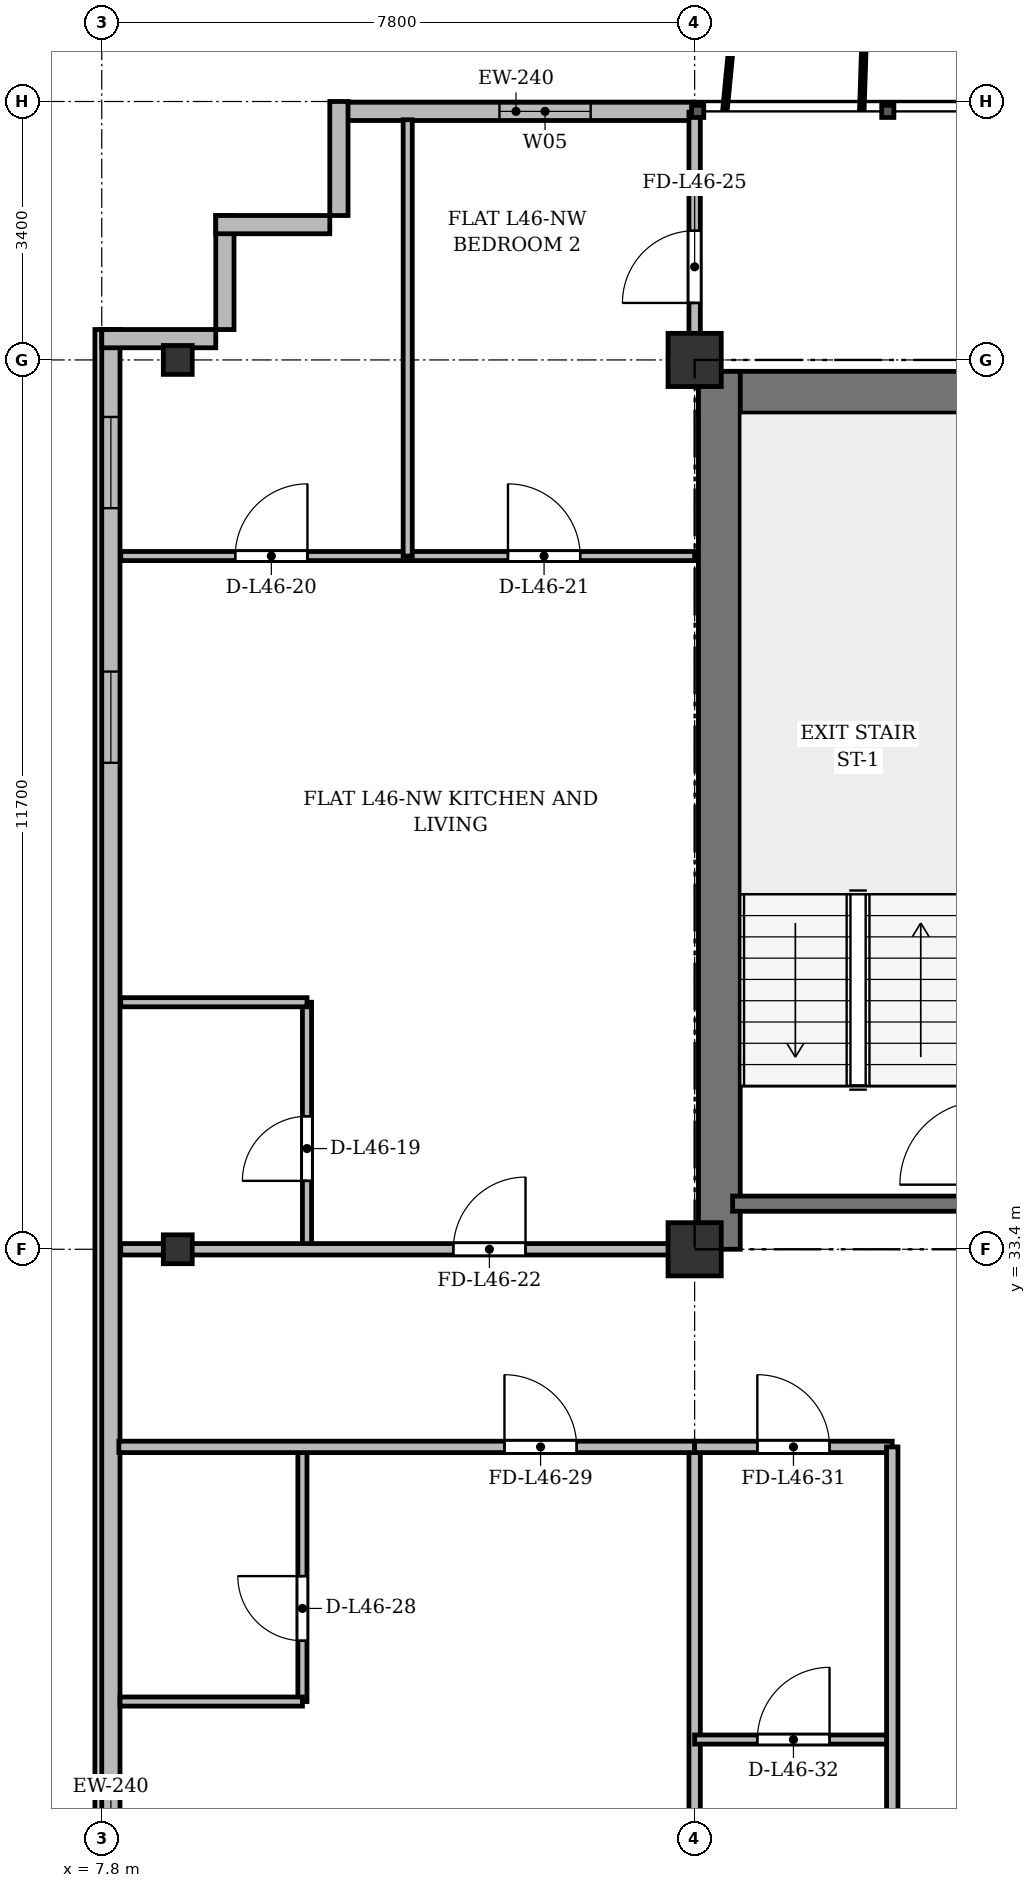
"""IFC4 building model, lengths in metres.
Left out: names, types, materials, properties, quantities, classifications, styles, units other than length and angle.
Written with IfcOpenShell. Run it as: python <this file> out.ifc"""

import sys

from ifc_helpers import new_model, si_unit, direction, frame, frame_2d, origin, origin_2d, place, context, subcontext, project, spatial, rectangle, i_section, extrude, source, transform, mapped, element, fill, save


model = new_model("IFC4")
c1 = context("Model", 3, precision=1e-05, world=origin(), true_north=direction((0.0, 1.0)))
c2 = subcontext(c1, "Body", "Model", "MODEL_VIEW")
j1 = project(units=[si_unit("LENGTHUNIT", "METRE"), si_unit("PLANEANGLEUNIT", "RADIAN")], contexts=[c1])
p1 = place(None, origin())
s1 = spatial("IfcSite", under=j1, at=p1, CompositionType="ELEMENT")
p2 = place(p1, origin())
s2 = spatial("IfcBuilding", under=s1, at=p2, CompositionType="ELEMENT")
p3 = place(p2, frame((0.0, 0.0, 175.3)))
s3 = spatial("IfcBuildingStorey", under=s2, at=p3, CompositionType="ELEMENT", Elevation=175.3)
m1 = source(origin(), c2, "Body", "SweptSolid", [
    extrude(i_section(OverallWidth=0.38, OverallDepth=0.38, WebThickness=0.02, FlangeThickness=0.03, at=origin_2d()), origin(), (0.0, 0.0, 1.0), 3.6),
])
for number, where, z_axis, x_axis in (
    (1, (8.8, 33.4, 0.0), (0.0, 0.0, 1.0), (1.0, 0.0, 0.0)),
    (2, (8.8, 45.1, 0.0), (0.0, 0.0, 1.0), (1.0, 0.0, 0.0)),
):
    element("IfcColumn", number, at=place(p3, frame(where, z_axis=z_axis, x_axis=x_axis)), inside=s3, PredefinedType="COLUMN", context=c2, shape_type="MappedRepresentation", body=[
        mapped(m1, transform((0.0, 0.0, 0.0), x_axis=(1.0, 0.0, 0.0), y_axis=(0.0, 1.0, 0.0), z_axis=(0.0, 0.0, 1.0), scale=1.0)),
    ])
m2 = source(origin(), c2, "Body", "SweptSolid", [
    extrude(rectangle(XDim=0.7, YDim=0.7, at=origin_2d()), origin(), (0.0, 0.0, 1.0), 3.6),
])
for number, where, z_axis, x_axis in (
    (3, (15.6, 33.4, 0.0), (0.0, 0.0, 1.0), (1.0, 0.0, 0.0)),
    (4, (15.6, 45.1, 0.0), (0.0, 0.0, 1.0), (1.0, 0.0, 0.0)),
):
    element("IfcColumn", number, at=place(p3, frame(where, z_axis=z_axis, x_axis=x_axis)), inside=s3, PredefinedType="COLUMN", context=c2, shape_type="MappedRepresentation", body=[
        mapped(m2, transform((0.0, 0.0, 0.0), x_axis=(1.0, 0.0, 0.0), y_axis=(0.0, 1.0, 0.0), z_axis=(0.0, 0.0, 1.0), scale=1.0)),
    ])
p4 = place(p3, frame((10.9, 48.37, 0.0), z_axis=(0.0, 0.0, 1.0), x_axis=(1.0, 0.0, 0.0)))
e5 = element("IfcWall", 5, at=p4, inside=s3, PredefinedType="SOLIDWALL", context=c2, shape_type="SweptSolid", body=[
    extrude(rectangle(XDim=4.7, YDim=0.24, at=frame_2d((2.35, 0.0))), origin(), (0.0, 0.0, 1.0), 3.35),
])
p5 = place(p4, frame((2.132, 0.0, 0.9)))
e6 = element("IfcOpeningElement", 6, at=p5, cuts=e5, PredefinedType="OPENING", context=c2, shape_type="SweptSolid", body=[
    extrude(rectangle(XDim=1.2, YDim=1.65, at=frame_2d((0.6, 0.825))), frame((0.0, 0.13, 0.0), z_axis=(0.0, -1.0, 0.0), x_axis=(1.0, 0.0, 0.0)), (0.0, 0.0, 1.0), 0.26),
])
p6 = place(p3, frame((7.92, 6.3, 0.0), z_axis=(0.0, 0.0, 1.0), x_axis=(0.0, 1.0, 0.0)))
e7 = element("IfcWall", 7, at=p6, inside=s3, PredefinedType="SOLIDWALL", context=c2, shape_type="SweptSolid", body=[
    extrude(rectangle(XDim=39.2, YDim=0.24, at=frame_2d((19.6, 0.0))), origin(), (0.0, 0.0, 1.0), 3.35),
])
p7 = place(p6, frame((1.45, 0.0, 0.92)))
e8 = element("IfcOpeningElement", 8, at=p7, cuts=e7, PredefinedType="OPENING", context=c2, shape_type="SweptSolid", body=[
    extrude(rectangle(XDim=1.2, YDim=1.65, at=frame_2d((0.6, 0.825))), frame((0.0, 0.13, 0.0), z_axis=(0.0, -1.0, 0.0), x_axis=(1.0, 0.0, 0.0)), (0.0, 0.0, 1.0), 0.26),
])
p8 = place(p6, frame((3.8, 0.0, 0.92)))
e9 = element("IfcOpeningElement", 9, at=p8, cuts=e7, PredefinedType="OPENING", context=c2, shape_type="SweptSolid", body=[
    extrude(rectangle(XDim=2.6, YDim=1.9, at=frame_2d((1.3, 0.95))), frame((0.0, 0.13, 0.0), z_axis=(0.0, -1.0, 0.0), x_axis=(1.0, 0.0, 0.0)), (0.0, 0.0, 1.0), 0.26),
])
p9 = place(p6, frame((8.0, 0.0, 0.92)))
e10 = element("IfcOpeningElement", 10, at=p9, cuts=e7, PredefinedType="OPENING", context=c2, shape_type="SweptSolid", body=[
    extrude(rectangle(XDim=2.6, YDim=1.9, at=frame_2d((1.3, 0.95))), frame((0.0, 0.13, 0.0), z_axis=(0.0, -1.0, 0.0), x_axis=(1.0, 0.0, 0.0)), (0.0, 0.0, 1.0), 0.26),
])
p10 = place(p6, frame((15.2, 0.0, 0.92)))
e11 = element("IfcOpeningElement", 11, at=p10, cuts=e7, PredefinedType="OPENING", context=c2, shape_type="SweptSolid", body=[
    extrude(rectangle(XDim=2.6, YDim=1.9, at=frame_2d((1.3, 0.95))), frame((0.0, 0.13, 0.0), z_axis=(0.0, -1.0, 0.0), x_axis=(1.0, 0.0, 0.0)), (0.0, 0.0, 1.0), 0.26),
])
p11 = place(p6, frame((33.5, 0.0, 0.92)))
e12 = element("IfcOpeningElement", 12, at=p11, cuts=e7, PredefinedType="OPENING", context=c2, shape_type="SweptSolid", body=[
    extrude(rectangle(XDim=1.2, YDim=1.65, at=frame_2d((0.6, 0.825))), frame((0.0, 0.13, 0.0), z_axis=(0.0, -1.0, 0.0), x_axis=(1.0, 0.0, 0.0)), (0.0, 0.0, 1.0), 0.26),
])
p12 = place(p6, frame((36.85, 0.0, 0.92)))
e13 = element("IfcOpeningElement", 13, at=p12, cuts=e7, PredefinedType="OPENING", context=c2, shape_type="SweptSolid", body=[
    extrude(rectangle(XDim=1.2, YDim=1.65, at=frame_2d((0.6, 0.825))), frame((0.0, 0.13, 0.0), z_axis=(0.0, -1.0, 0.0), x_axis=(1.0, 0.0, 0.0)), (0.0, 0.0, 1.0), 0.26),
])
for number, where, z_axis, x_axis in (
    (14, (7.8, 45.38, 0.0), (0.0, 0.0, 1.0), (1.0, 0.0, 0.0)),
    (15, (9.42, 45.5, 0.0), (0.0, 0.0, 1.0), (0.0, 1.0, 0.0)),
    (16, (9.3, 46.88, 0.0), (0.0, 0.0, 1.0), (1.0, 0.0, 0.0)),
    (17, (10.92, 47.0, 0.0), (0.0, 0.0, 1.0), (0.0, 1.0, 0.0)),
):
    element("IfcWall", number, at=place(p3, frame(where, z_axis=z_axis, x_axis=x_axis)), inside=s3, PredefinedType="SOLIDWALL", context=c2, shape_type="SweptSolid", body=[
        extrude(rectangle(XDim=1.5, YDim=0.24, at=frame_2d((0.75, 0.0))), origin(), (0.0, 0.0, 1.0), 3.35),
    ])
p13 = place(p3, frame((15.65, 44.675, 0.0), z_axis=(0.0, 0.0, 1.0), x_axis=(1.0, 0.0, 0.0)))
e18 = element("IfcWall", 18, at=p13, inside=s3, PredefinedType="SHEAR", context=c2, shape_type="SweptSolid", body=[
    extrude(rectangle(XDim=43.1, YDim=0.55, at=frame_2d((21.55, 0.0))), origin(), (0.0, 0.0, 1.0), 3.35),
])
p14 = place(p3, frame((15.925, 33.4, 0.0), z_axis=(0.0, 0.0, 1.0), x_axis=(0.0, 1.0, 0.0)))
e19 = element("IfcWall", 19, at=p14, inside=s3, PredefinedType="SHEAR", context=c2, shape_type="SweptSolid", body=[
    extrude(rectangle(XDim=11.55, YDim=0.55, at=frame_2d((5.775, 0.0))), origin(), (0.0, 0.0, 1.0), 3.35),
])
p15 = place(p3, frame((16.1, 34.0, 0.0), z_axis=(0.0, 0.0, 1.0), x_axis=(1.0, 0.0, 0.0)))
e20 = element("IfcWall", 20, at=p15, inside=s3, PredefinedType="SHEAR", context=c2, shape_type="SweptSolid", body=[
    extrude(rectangle(XDim=3.4, YDim=0.2, at=frame_2d((1.7, 0.0))), origin(), (0.0, 0.0, 1.0), 3.35),
])
p16 = place(p3, frame((10.5, 33.4, 0.0), z_axis=(0.0, 0.0, 1.0), x_axis=(0.0, 1.0, 0.0)))
e21 = element("IfcWall", 21, at=p16, inside=s3, PredefinedType="PARTITIONING", context=c2, shape_type="SweptSolid", body=[
    extrude(rectangle(XDim=3.25, YDim=0.12, at=frame_2d((1.625, 0.0))), origin(), (0.0, 0.0, 1.0), 2.75),
])
p17 = place(p16, frame((0.9, 0.0, 0.0)))
e22 = element("IfcOpeningElement", 22, at=p17, cuts=e21, PredefinedType="OPENING", context=c2, shape_type="SweptSolid", body=[
    extrude(rectangle(XDim=0.85, YDim=2.1, at=frame_2d((0.425, 1.05))), frame((0.0, 0.07, 0.0), z_axis=(0.0, -1.0, 0.0), x_axis=(1.0, 0.0, 0.0)), (0.0, 0.0, 1.0), 0.14),
])
p18 = place(p3, frame((8.05, 36.65, 0.0), z_axis=(0.0, 0.0, 1.0), x_axis=(1.0, 0.0, 0.0)))
e23 = element("IfcWall", 23, at=p18, inside=s3, PredefinedType="PARTITIONING", context=c2, shape_type="SweptSolid", body=[
    extrude(rectangle(XDim=2.45, YDim=0.12, at=frame_2d((1.225, 0.0))), origin(), (0.0, 0.0, 1.0), 2.85),
])
p19 = place(p3, frame((8.05, 42.52, 0.0), z_axis=(0.0, 0.0, 1.0), x_axis=(1.0, 0.0, 0.0)))
e24 = element("IfcWall", 24, at=p19, inside=s3, PredefinedType="PARTITIONING", context=c2, shape_type="SweptSolid", body=[
    extrude(rectangle(XDim=3.775, YDim=0.12, at=frame_2d((1.887, 0.0))), origin(), (0.0, 0.0, 1.0), 2.85),
])
p20 = place(p19, frame((1.506, 0.0, 0.0)))
e25 = element("IfcOpeningElement", 25, at=p20, cuts=e24, PredefinedType="OPENING", context=c2, shape_type="SweptSolid", body=[
    extrude(rectangle(XDim=0.95, YDim=2.15, at=frame_2d((0.475, 1.075))), frame((0.0, 0.07, 0.0), z_axis=(0.0, -1.0, 0.0), x_axis=(1.0, 0.0, 0.0)), (0.0, 0.0, 1.0), 0.14),
])
p21 = place(p3, frame((11.825, 42.52, 0.0), z_axis=(0.0, 0.0, 1.0), x_axis=(1.0, 0.0, 0.0)))
e26 = element("IfcWall", 26, at=p21, inside=s3, PredefinedType="PARTITIONING", context=c2, shape_type="SweptSolid", body=[
    extrude(rectangle(XDim=3.775, YDim=0.12, at=frame_2d((1.888, 0.0))), origin(), (0.0, 0.0, 1.0), 2.85),
])
p22 = place(p21, frame((1.319, 0.0, 0.0)))
e27 = element("IfcOpeningElement", 27, at=p22, cuts=e26, PredefinedType="OPENING", context=c2, shape_type="SweptSolid", body=[
    extrude(rectangle(XDim=0.95, YDim=2.15, at=frame_2d((0.475, 1.075))), frame((0.0, 0.07, 0.0), z_axis=(0.0, -1.0, 0.0), x_axis=(1.0, 0.0, 0.0)), (0.0, 0.0, 1.0), 0.14),
])
p23 = place(p3, frame((11.825, 42.52, 0.0), z_axis=(0.0, 0.0, 1.0), x_axis=(0.0, 1.0, 0.0)))
e28 = element("IfcWall", 28, at=p23, inside=s3, PredefinedType="PARTITIONING", context=c2, shape_type="SweptSolid", body=[
    extrude(rectangle(XDim=5.74, YDim=0.12, at=frame_2d((2.87, 0.0))), origin(), (0.0, 0.0, 1.0), 2.75),
])
p24 = place(p3, frame((8.05, 33.4, 0.0), z_axis=(0.0, 0.0, 1.0), x_axis=(1.0, 0.0, 0.0)))
e29 = element("IfcWall", 29, at=p24, inside=s3, PredefinedType="PARTITIONING", context=c2, shape_type="SweptSolid", body=[
    extrude(rectangle(XDim=7.55, YDim=0.15, at=frame_2d((3.775, 0.0))), origin(), (0.0, 0.0, 1.0), 2.75),
])
p25 = place(p24, frame((4.375, 0.0, 0.0)))
e30 = element("IfcOpeningElement", 30, at=p25, cuts=e29, PredefinedType="OPENING", context=c2, shape_type="SweptSolid", body=[
    extrude(rectangle(XDim=0.95, YDim=2.15, at=frame_2d((0.475, 1.075))), frame((0.0, 0.085, 0.0), z_axis=(0.0, -1.0, 0.0), x_axis=(1.0, 0.0, 0.0)), (0.0, 0.0, 1.0), 0.17),
])
p26 = place(p3, frame((15.6, 44.75, 0.0), z_axis=(0.0, 0.0, 1.0), x_axis=(0.0, 1.0, 0.0)))
e31 = element("IfcWall", 31, at=p26, inside=s3, PredefinedType="PARTITIONING", context=c2, shape_type="SweptSolid", body=[
    extrude(rectangle(XDim=3.61, YDim=0.15, at=frame_2d((1.805, 0.0))), origin(), (0.0, 0.0, 1.0), 2.85),
])
p27 = place(p26, frame((1.1, 0.0, 0.0)))
e32 = element("IfcOpeningElement", 32, at=p27, cuts=e31, PredefinedType="OPENING", context=c2, shape_type="SweptSolid", body=[
    extrude(rectangle(XDim=0.95, YDim=2.15, at=frame_2d((0.475, 1.075))), frame((0.0, 0.085, 0.0), z_axis=(0.0, -1.0, 0.0), x_axis=(1.0, 0.0, 0.0)), (0.0, 0.0, 1.0), 0.17),
])
p28 = place(p3, frame((15.6, 3.525, 0.0), z_axis=(0.0, 0.0, 1.0), x_axis=(0.0, 1.0, 0.0)))
e33 = element("IfcWall", 33, at=p28, inside=s3, PredefinedType="PARTITIONING", context=c2, shape_type="SweptSolid", body=[
    extrude(rectangle(XDim=27.275, YDim=0.15, at=frame_2d((13.638, 0.0))), origin(), (0.0, 0.0, 1.0), 2.85),
])
p29 = place(p3, frame((10.44, 27.45, 0.0), z_axis=(0.0, 0.0, 1.0), x_axis=(0.0, 1.0, 0.0)))
e34 = element("IfcWall", 34, at=p29, inside=s3, PredefinedType="PARTITIONING", context=c2, shape_type="SweptSolid", body=[
    extrude(rectangle(XDim=3.35, YDim=0.12, at=frame_2d((1.675, 0.0))), origin(), (0.0, 0.0, 1.0), 3.35),
])
p30 = place(p29, frame((0.8, 0.0, 0.0)))
e35 = element("IfcOpeningElement", 35, at=p30, cuts=e34, PredefinedType="OPENING", context=c2, shape_type="SweptSolid", body=[
    extrude(rectangle(XDim=0.85, YDim=2.1, at=frame_2d((0.425, 1.05))), frame((0.0, 0.07, 0.0), z_axis=(0.0, -1.0, 0.0), x_axis=(1.0, 0.0, 0.0)), (0.0, 0.0, 1.0), 0.14),
])
p31 = place(p3, frame((8.04, 27.45, 0.0), z_axis=(0.0, 0.0, 1.0), x_axis=(1.0, 0.0, 0.0)))
e36 = element("IfcWall", 36, at=p31, inside=s3, PredefinedType="PARTITIONING", context=c2, shape_type="SweptSolid", body=[
    extrude(rectangle(XDim=2.4, YDim=0.12, at=frame_2d((1.2, 0.0))), origin(), (0.0, 0.0, 1.0), 2.85),
])
p32 = place(p3, frame((8.025, 30.8, 0.0), z_axis=(0.0, 0.0, 1.0), x_axis=(1.0, 0.0, 0.0)))
e37 = element("IfcWall", 37, at=p32, inside=s3, PredefinedType="PARTITIONING", context=c2, shape_type="SweptSolid", body=[
    extrude(rectangle(XDim=7.575, YDim=0.15, at=frame_2d((3.788, 0.0))), origin(), (0.0, 0.0, 1.0), 2.85),
])
p33 = place(p32, frame((5.073, 0.0, 0.0)))
e38 = element("IfcOpeningElement", 38, at=p33, cuts=e37, PredefinedType="OPENING", context=c2, shape_type="SweptSolid", body=[
    extrude(rectangle(XDim=0.95, YDim=2.15, at=frame_2d((0.475, 1.075))), frame((0.0, 0.085, 0.0), z_axis=(0.0, -1.0, 0.0), x_axis=(1.0, 0.0, 0.0)), (0.0, 0.0, 1.0), 0.17),
])
p34 = place(p3, frame((15.6, 30.8, 0.0), z_axis=(0.0, 0.0, 1.0), x_axis=(1.0, 0.0, 0.0)))
e39 = element("IfcWall", 39, at=p34, inside=s3, PredefinedType="PARTITIONING", context=c2, shape_type="SweptSolid", body=[
    extrude(rectangle(XDim=2.6, YDim=0.15, at=frame_2d((1.3, 0.0))), origin(), (0.0, 0.0, 1.0), 2.85),
])
p35 = place(p34, frame((0.825, 0.0, 0.0)))
e40 = element("IfcOpeningElement", 40, at=p35, cuts=e39, PredefinedType="OPENING", context=c2, shape_type="SweptSolid", body=[
    extrude(rectangle(XDim=0.95, YDim=2.15, at=frame_2d((0.475, 1.075))), frame((0.0, 0.085, 0.0), z_axis=(0.0, -1.0, 0.0), x_axis=(1.0, 0.0, 0.0)), (0.0, 0.0, 1.0), 0.17),
])
p36 = place(p3, frame((15.6, 26.95, 0.0), z_axis=(0.0, 0.0, 1.0), x_axis=(1.0, 0.0, 0.0)))
e41 = element("IfcWall", 41, at=p36, inside=s3, PredefinedType="PARTITIONING", context=c2, shape_type="SweptSolid", body=[
    extrude(rectangle(XDim=2.6, YDim=0.12, at=frame_2d((1.3, 0.0))), origin(), (0.0, 0.0, 1.0), 2.85),
])
p37 = place(p36, frame((0.825, 0.0, 0.0)))
e42 = element("IfcOpeningElement", 42, at=p37, cuts=e41, PredefinedType="OPENING", context=c2, shape_type="SweptSolid", body=[
    extrude(rectangle(XDim=0.95, YDim=2.15, at=frame_2d((0.475, 1.075))), frame((0.0, 0.07, 0.0), z_axis=(0.0, -1.0, 0.0), x_axis=(1.0, 0.0, 0.0)), (0.0, 0.0, 1.0), 0.14),
])
p38 = place(p3, frame((18.2, 6.81, 0.0), z_axis=(0.0, 0.0, 1.0), x_axis=(0.0, 1.0, 0.0)))
e43 = element("IfcWall", 43, at=p38, inside=s3, PredefinedType="PARTITIONING", context=c2, shape_type="SweptSolid", body=[
    extrude(rectangle(XDim=23.99, YDim=0.15, at=frame_2d((11.995, 0.0))), origin(), (0.0, 0.0, 1.0), 2.75),
])
m3 = source(origin(), c2, "Body", "SweptSolid", [
    extrude(rectangle(XDim=1.2, YDim=1.65, at=frame_2d((0.6, 0.825))), frame((0.0, 0.03, 0.0), z_axis=(0.0, -1.0, 0.0), x_axis=(1.0, 0.0, 0.0)), (0.0, 0.0, 1.0), 0.06),
])
p39 = place(p5, origin())
e44 = element("IfcWindow", 44, at=p39, inside=s3, PartitioningType="SINGLE_PANEL", PredefinedType="WINDOW", context=c2, shape_type="MappedRepresentation", body=[
    mapped(m3, transform((0.0, 0.0, 0.0), x_axis=(1.0, 0.0, 0.0), y_axis=(0.0, 1.0, 0.0), z_axis=(0.0, 0.0, 1.0), scale=1.0)),
])
fill(e6, e44)
p40 = place(p11, origin())
e45 = element("IfcWindow", 45, at=p40, inside=s3, PartitioningType="SINGLE_PANEL", PredefinedType="WINDOW", context=c2, shape_type="MappedRepresentation", body=[
    mapped(m3, transform((0.0, 0.0, 0.0), x_axis=(1.0, 0.0, 0.0), y_axis=(0.0, 1.0, 0.0), z_axis=(0.0, 0.0, 1.0), scale=1.0)),
])
fill(e12, e45)
p41 = place(p12, origin())
e46 = element("IfcWindow", 46, at=p41, inside=s3, PartitioningType="SINGLE_PANEL", PredefinedType="WINDOW", context=c2, shape_type="MappedRepresentation", body=[
    mapped(m3, transform((0.0, 0.0, 0.0), x_axis=(1.0, 0.0, 0.0), y_axis=(0.0, 1.0, 0.0), z_axis=(0.0, 0.0, 1.0), scale=1.0)),
])
fill(e13, e46)
m4 = source(origin(), c2, "Body", "SweptSolid", [
    extrude(rectangle(XDim=0.85, YDim=2.1, at=frame_2d((0.425, 1.05))), frame((0.0, 0.025, 0.0), z_axis=(0.0, -1.0, 0.0), x_axis=(1.0, 0.0, 0.0)), (0.0, 0.0, 1.0), 0.05),
])
p42 = place(p17, origin())
e47 = element("IfcDoor", 47, at=p42, inside=s3, OperationType="SINGLE_SWING_LEFT", PredefinedType="DOOR", context=c2, shape_type="MappedRepresentation", body=[
    mapped(m4, transform((0.0, 0.0, 0.0), x_axis=(1.0, 0.0, 0.0), y_axis=(0.0, 1.0, 0.0), z_axis=(0.0, 0.0, 1.0), scale=1.0)),
])
fill(e22, e47)
m5 = source(origin(), c2, "Body", "SweptSolid", [
    extrude(rectangle(XDim=0.95, YDim=2.15, at=frame_2d((0.475, 1.075))), frame((0.0, 0.025, 0.0), z_axis=(0.0, -1.0, 0.0), x_axis=(1.0, 0.0, 0.0)), (0.0, 0.0, 1.0), 0.05),
])
p43 = place(p20, origin())
e48 = element("IfcDoor", 48, at=p43, inside=s3, OperationType="SINGLE_SWING_RIGHT", PredefinedType="DOOR", context=c2, shape_type="MappedRepresentation", body=[
    mapped(m5, transform((0.0, 0.0, 0.0), x_axis=(1.0, 0.0, 0.0), y_axis=(0.0, 1.0, 0.0), z_axis=(0.0, 0.0, 1.0), scale=1.0)),
])
fill(e25, e48)
p44 = place(p22, origin())
e49 = element("IfcDoor", 49, at=p44, inside=s3, OperationType="SINGLE_SWING_LEFT", PredefinedType="DOOR", context=c2, shape_type="MappedRepresentation", body=[
    mapped(m5, transform((0.0, 0.0, 0.0), x_axis=(1.0, 0.0, 0.0), y_axis=(0.0, 1.0, 0.0), z_axis=(0.0, 0.0, 1.0), scale=1.0)),
])
fill(e27, e49)
p45 = place(p25, origin())
e50 = element("IfcDoor", 50, at=p45, inside=s3, OperationType="SINGLE_SWING_RIGHT", PredefinedType="DOOR", context=c2, shape_type="MappedRepresentation", body=[
    mapped(m5, transform((0.0, 0.0, 0.0), x_axis=(1.0, 0.0, 0.0), y_axis=(0.0, 1.0, 0.0), z_axis=(0.0, 0.0, 1.0), scale=1.0)),
])
fill(e30, e50)
p46 = place(p27, origin())
e51 = element("IfcDoor", 51, at=p46, inside=s3, OperationType="SINGLE_SWING_LEFT", PredefinedType="DOOR", context=c2, shape_type="MappedRepresentation", body=[
    mapped(m5, transform((0.0, 0.0, 0.0), x_axis=(1.0, 0.0, 0.0), y_axis=(0.0, 1.0, 0.0), z_axis=(0.0, 0.0, 1.0), scale=1.0)),
])
fill(e32, e51)
p47 = place(p30, origin())
e52 = element("IfcDoor", 52, at=p47, inside=s3, OperationType="SINGLE_SWING_RIGHT", PredefinedType="DOOR", context=c2, shape_type="MappedRepresentation", body=[
    mapped(m4, transform((0.0, 0.0, 0.0), x_axis=(1.0, 0.0, 0.0), y_axis=(0.0, 1.0, 0.0), z_axis=(0.0, 0.0, 1.0), scale=1.0)),
])
fill(e35, e52)
p48 = place(p33, origin())
e53 = element("IfcDoor", 53, at=p48, inside=s3, OperationType="SINGLE_SWING_LEFT", PredefinedType="DOOR", context=c2, shape_type="MappedRepresentation", body=[
    mapped(m5, transform((0.0, 0.0, 0.0), x_axis=(1.0, 0.0, 0.0), y_axis=(0.0, 1.0, 0.0), z_axis=(0.0, 0.0, 1.0), scale=1.0)),
])
fill(e38, e53)
p49 = place(p35, origin())
e54 = element("IfcDoor", 54, at=p49, inside=s3, OperationType="SINGLE_SWING_LEFT", PredefinedType="DOOR", context=c2, shape_type="MappedRepresentation", body=[
    mapped(m5, transform((0.0, 0.0, 0.0), x_axis=(1.0, 0.0, 0.0), y_axis=(0.0, 1.0, 0.0), z_axis=(0.0, 0.0, 1.0), scale=1.0)),
])
fill(e40, e54)
p50 = place(p37, origin())
e55 = element("IfcDoor", 55, at=p50, inside=s3, OperationType="SINGLE_SWING_RIGHT", PredefinedType="DOOR", context=c2, shape_type="MappedRepresentation", body=[
    mapped(m5, transform((0.0, 0.0, 0.0), x_axis=(1.0, 0.0, 0.0), y_axis=(0.0, 1.0, 0.0), z_axis=(0.0, 0.0, 1.0), scale=1.0)),
])
fill(e42, e55)
save(model, sys.argv[1])
